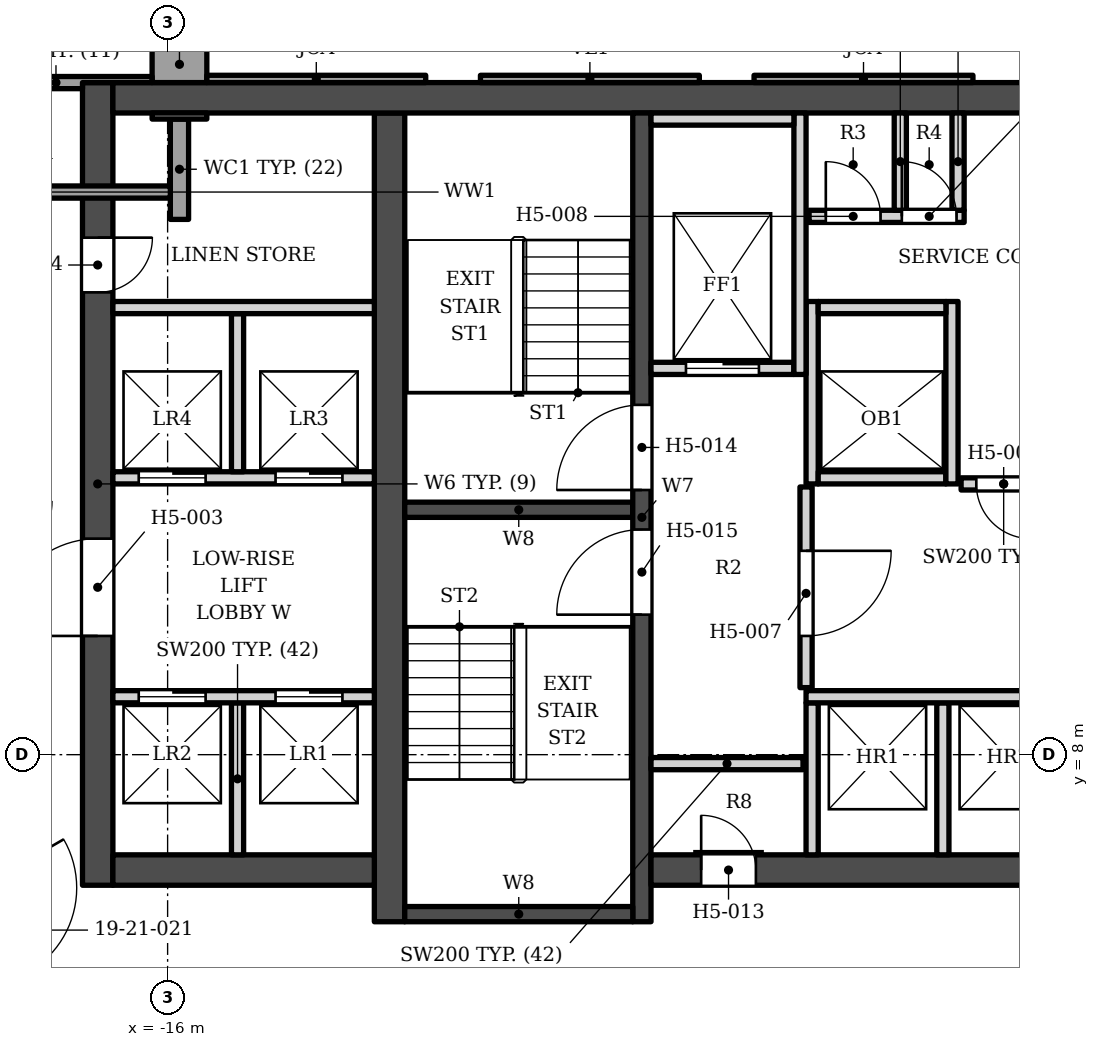
"""IFC4 building model, lengths in metres.
Left out: names, types, materials, properties, quantities, classifications, styles, units other than length and angle.
Written with IfcOpenShell. Run it as: python <this file> out.ifc"""

import sys

from ifc_helpers import new_model, si_unit, direction, frame, frame_2d, origin, place, context, subcontext, project, spatial, polyline, rectangle, outline, extrude, element, fill, save


model = new_model("IFC4")
c1 = context("Model", 3, precision=1e-05, world=origin(), true_north=direction((0.0, 1.0)))
c2 = subcontext(c1, "Body", "Model", "MODEL_VIEW")
j1 = project(units=[si_unit("LENGTHUNIT", "METRE"), si_unit("PLANEANGLEUNIT", "RADIAN")], contexts=[c1])
p1 = place(None, origin())
s1 = spatial("IfcSite", under=j1, at=p1, CompositionType="ELEMENT")
p2 = place(p1, origin())
s2 = spatial("IfcBuilding", under=s1, at=p2, CompositionType="ELEMENT")
p3 = place(p2, frame((0.0, 0.0, 91.8)))
s3 = spatial("IfcBuildingStorey", under=s2, at=p3, CompositionType="ELEMENT", Elevation=91.8)
p4 = place(p3, frame((-16.9, 18.802, 0.0), z_axis=(0.0, 0.0, 1.0), x_axis=(1.0, 0.0, 0.0)))
e1 = element("IfcWall", 1, at=p4, inside=s3, PredefinedType="SHEAR", context=c2, shape_type="SweptSolid", body=[
    extrude(rectangle(XDim=33.8, YDim=0.5, at=frame_2d((16.9, 0.0))), origin(), (0.0, 0.0, 1.0), 3.4),
])
p5 = place(p3, frame((-12.35, 5.253, 0.0), z_axis=(0.0, 0.0, 1.0), x_axis=(0.0, 1.0, 0.0)))
e2 = element("IfcWall", 2, at=p5, inside=s3, PredefinedType="SHEAR", context=c2, shape_type="SweptSolid", body=[
    extrude(rectangle(XDim=13.3, YDim=0.5, at=frame_2d((6.65, 0.0))), origin(), (0.0, 0.0, 1.0), 3.4),
])
p6 = place(p3, frame((-8.2, 5.253, 0.0), z_axis=(0.0, 0.0, 1.0), x_axis=(0.0, 1.0, 0.0)))
e3 = element("IfcWall", 3, at=p6, inside=s3, PredefinedType="SHEAR", context=c2, shape_type="SweptSolid", body=[
    extrude(rectangle(XDim=13.3, YDim=0.3, at=frame_2d((6.65, 0.0))), origin(), (0.0, 0.0, 1.0), 3.4),
])
p7 = place(p6, frame((7.1, 0.0, 0.0)))
e4 = element("IfcOpeningElement", 4, at=p7, cuts=e3, PredefinedType="OPENING", context=c2, shape_type="SweptSolid", body=[
    extrude(rectangle(XDim=1.4, YDim=2.1, at=frame_2d((0.7, 1.05))), frame((0.0, 0.16, 0.0), z_axis=(0.0, -1.0, 0.0), x_axis=(1.0, 0.0, 0.0)), (0.0, 0.0, 1.0), 0.32),
])
p8 = place(p6, frame((5.05, 0.0, 0.0)))
e5 = element("IfcOpeningElement", 5, at=p8, cuts=e3, PredefinedType="OPENING", context=c2, shape_type="SweptSolid", body=[
    extrude(rectangle(XDim=1.4, YDim=2.1, at=frame_2d((0.7, 1.05))), frame((0.0, 0.16, 0.0), z_axis=(0.0, -1.0, 0.0), x_axis=(1.0, 0.0, 0.0)), (0.0, 0.0, 1.0), 0.32),
])
for number, where, z_axis, x_axis in (
    (6, (-12.1, 12.028, 0.0), (0.0, 0.0, 1.0), (1.0, 0.0, 0.0)),
    (7, (-12.1, 5.378, 0.0), (0.0, 0.0, 1.0), (1.0, 0.0, 0.0)),
):
    element("IfcWall", number, at=place(p3, frame(where, z_axis=z_axis, x_axis=x_axis)), inside=s3, PredefinedType="SHEAR", context=c2, shape_type="SweptSolid", body=[
        extrude(rectangle(XDim=3.75, YDim=0.25, at=frame_2d((1.875, 0.0))), origin(), (0.0, 0.0, 1.0), 3.4),
    ])
p9 = place(p3, frame((-8.05, 6.103, 0.0), z_axis=(0.0, 0.0, 1.0), x_axis=(1.0, 0.0, 0.0)))
e8 = element("IfcWall", 8, at=p9, inside=s3, PredefinedType="SHEAR", context=c2, shape_type="SweptSolid", body=[
    extrude(rectangle(XDim=7.05, YDim=0.5, at=frame_2d((3.525, 0.0))), origin(), (0.0, 0.0, 1.0), 3.4),
])
p10 = place(p9, frame((0.825, 0.0, 0.0)))
e9 = element("IfcOpeningElement", 9, at=p10, cuts=e8, PredefinedType="OPENING", context=c2, shape_type="SweptSolid", body=[
    extrude(rectangle(XDim=0.9, YDim=2.1, at=frame_2d((0.45, 1.05))), frame((0.0, 0.26, 0.0), z_axis=(0.0, -1.0, 0.0), x_axis=(1.0, 0.0, 0.0)), (0.0, 0.0, 1.0), 0.52),
])
p11 = place(p3, frame((-12.6, 6.103, 0.0), z_axis=(0.0, 0.0, 1.0), x_axis=(-1.0, 0.0, 0.0)))
e10 = element("IfcWall", 10, at=p11, inside=s3, PredefinedType="SHEAR", context=c2, shape_type="SweptSolid", body=[
    extrude(rectangle(XDim=4.3, YDim=0.5, at=frame_2d((2.15, 0.0))), origin(), (0.0, 0.0, 1.0), 3.4),
])
p12 = place(p3, frame((-17.15, 5.853, 0.0), z_axis=(0.0, 0.0, 1.0), x_axis=(0.0, 1.0, 0.0)))
e11 = element("IfcWall", 11, at=p12, inside=s3, PredefinedType="SHEAR", context=c2, shape_type="SweptSolid", body=[
    extrude(rectangle(XDim=13.2, YDim=0.5, at=frame_2d((6.6, 0.0))), origin(), (0.0, 0.0, 1.0), 3.4),
])
p13 = place(p12, frame((4.1, 0.0, 0.0)))
e12 = element("IfcOpeningElement", 12, at=p13, cuts=e11, PredefinedType="OPENING", context=c2, shape_type="SweptSolid", body=[
    extrude(rectangle(XDim=1.6, YDim=2.1, at=frame_2d((0.8, 1.05))), frame((0.0, 0.26, 0.0), z_axis=(0.0, -1.0, 0.0), x_axis=(1.0, 0.0, 0.0)), (0.0, 0.0, 1.0), 0.52),
])
p14 = place(p12, frame((9.75, 0.0, 0.0)))
e13 = element("IfcOpeningElement", 13, at=p14, cuts=e11, PredefinedType="OPENING", context=c2, shape_type="SweptSolid", body=[
    extrude(rectangle(XDim=0.9, YDim=2.1, at=frame_2d((0.45, 1.05))), frame((0.0, 0.26, 0.0), z_axis=(0.0, -1.0, 0.0), x_axis=(1.0, 0.0, 0.0)), (0.0, 0.0, 1.0), 0.52),
])
p15 = place(p3, origin())
e14 = element("IfcWall", 14, at=p15, inside=s3, PredefinedType="SOLIDWALL", context=c2, shape_type="SweptSolid", body=[
    extrude(outline(polyline([(-15.355, 19.052), (-15.355, 19.653), (-16.255, 19.653), (-16.255, 19.052), (-15.355, 19.052)])), origin(), (0.0, 0.0, 1.0), 2.65),
])
p16 = place(p3, origin())
e15 = element("IfcWall", 15, at=p16, inside=s3, PredefinedType="SOLIDWALL", context=c2, shape_type="SweptSolid", body=[
    extrude(outline(polyline([(-15.355, 18.453), (-15.355, 18.552), (-16.255, 18.552), (-16.255, 18.453), (-15.355, 18.453)])), origin(), (0.0, 0.0, 1.0), 2.65),
])
p17 = place(p3, origin())
e16 = element("IfcWall", 16, at=p17, inside=s3, PredefinedType="SOLIDWALL", context=c2, shape_type="SweptSolid", body=[
    extrude(outline(polyline([(-15.655, 16.802), (-15.655, 18.453), (-15.955, 18.453), (-15.955, 16.802), (-15.655, 16.802)])), origin(), (0.0, 0.0, 1.0), 2.65),
])
p18 = place(p3, origin())
e17 = element("IfcWall", 17, at=p18, inside=s3, PredefinedType="SOLIDWALL", context=c2, shape_type="SweptSolid", body=[
    extrude(outline(polyline([(-6.355, 19.173), (-6.355, 19.052), (-2.755, 19.052), (-2.755, 19.173), (-6.355, 19.173)])), origin(), (0.0, 0.0, 1.0), 2.65),
])
p19 = place(p3, origin())
e18 = element("IfcWall", 18, at=p19, inside=s3, PredefinedType="ELEMENTEDWALL", context=c2, shape_type="SweptSolid", body=[
    extrude(outline(polyline([(-10.855, 19.173), (-10.855, 19.052), (-7.255, 19.052), (-7.255, 19.173), (-10.855, 19.173)])), origin(), (0.0, 0.0, 1.0), 2.65),
])
p20 = place(p3, origin())
e19 = element("IfcWall", 19, at=p20, inside=s3, PredefinedType="SOLIDWALL", context=c2, shape_type="SweptSolid", body=[
    extrude(outline(polyline([(-15.354, 19.173), (-15.354, 19.052), (-11.755, 19.052), (-11.755, 19.173), (-15.354, 19.173)])), origin(), (0.0, 0.0, 1.0), 2.65),
])
p21 = place(p3, origin())
e20 = element("IfcWall", 20, at=p21, inside=s3, PredefinedType="SOLIDWALL", context=c2, shape_type="SweptSolid", body=[
    extrude(outline(polyline([(-16.255, 19.052), (-16.255, 19.153), (-19.853, 19.153), (-19.853, 18.953), (-17.4, 18.953), (-17.4, 19.052), (-16.255, 19.052)])), origin(), (0.0, 0.0, 1.0), 2.65),
])
p22 = place(p3, frame((-15.955, 17.252, 0.0), z_axis=(0.0, 0.0, 1.0), x_axis=(-1.0, 0.0, 0.0)))
e21 = element("IfcWall", 21, at=p22, inside=s3, PredefinedType="ELEMENTEDWALL", context=c2, shape_type="SweptSolid", body=[
    extrude(rectangle(XDim=4.2, YDim=0.2, at=frame_2d((2.1, 0.0))), origin(), (0.0, 0.0, 1.0), 2.65),
])
p23 = place(p22, frame((2.7, 0.0, 0.0)))
e22 = element("IfcOpeningElement", 22, at=p23, cuts=e21, PredefinedType="OPENING", context=c2, shape_type="SweptSolid", body=[
    extrude(rectangle(XDim=1.2, YDim=2.4, at=frame_2d((0.6, 1.2))), frame((0.0, 0.11, 0.0), z_axis=(0.0, -1.0, 0.0), x_axis=(1.0, 0.0, 0.0)), (0.0, 0.0, 1.0), 0.22),
])
for number, where, z_axis, x_axis in (
    (23, (-14.85, 6.353, 0.0), (0.0, 0.0, 1.0), (0.0, 1.0, 0.0)),
    (24, (-5.4, 6.353, 0.0), (0.0, 0.0, 1.0), (0.0, 1.0, 0.0)),
    (25, (-3.25, 6.353, 0.0), (0.0, 0.0, 1.0), (0.0, 1.0, 0.0)),
    (26, (-8.05, 7.853, 0.0), (0.0, 0.0, 1.0), (1.0, 0.0, 0.0)),
):
    element("IfcWall", number, at=place(p3, frame(where, z_axis=z_axis, x_axis=x_axis)), inside=s3, PredefinedType="SOLIDWALL", context=c2, shape_type="SweptSolid", body=[
        extrude(rectangle(XDim=2.5, YDim=0.2, at=frame_2d((1.25, 0.0))), origin(), (0.0, 0.0, 1.0), 3.23),
    ])
p24 = place(p3, frame((-16.9, 8.953, 0.0), z_axis=(0.0, 0.0, 1.0), x_axis=(1.0, 0.0, 0.0)))
e27 = element("IfcWall", 27, at=p24, inside=s3, PredefinedType="SOLIDWALL", context=c2, shape_type="SweptSolid", body=[
    extrude(rectangle(XDim=4.3, YDim=0.2, at=frame_2d((2.15, 0.0))), origin(), (0.0, 0.0, 1.0), 3.23),
])
p25 = place(p24, frame((2.675, 0.0, 0.0)))
e28 = element("IfcOpeningElement", 28, at=p25, cuts=e27, PredefinedType="OPENING", context=c2, shape_type="SweptSolid", body=[
    extrude(rectangle(XDim=1.1, YDim=2.1, at=frame_2d((0.55, 1.05))), frame((0.0, 0.11, 0.0), z_axis=(0.0, -1.0, 0.0), x_axis=(1.0, 0.0, 0.0)), (0.0, 0.0, 1.0), 0.22),
])
p26 = place(p24, frame((0.425, 0.0, 0.0)))
e29 = element("IfcOpeningElement", 29, at=p26, cuts=e27, PredefinedType="OPENING", context=c2, shape_type="SweptSolid", body=[
    extrude(rectangle(XDim=1.1, YDim=2.1, at=frame_2d((0.55, 1.05))), frame((0.0, 0.11, 0.0), z_axis=(0.0, -1.0, 0.0), x_axis=(1.0, 0.0, 0.0)), (0.0, 0.0, 1.0), 0.22),
])
p27 = place(p3, frame((-5.5, 8.953, 0.0), z_axis=(0.0, 0.0, 1.0), x_axis=(1.0, 0.0, 0.0)))
e30 = element("IfcWall", 30, at=p27, inside=s3, PredefinedType="SOLIDWALL", context=c2, shape_type="SweptSolid", body=[
    extrude(rectangle(XDim=4.5, YDim=0.2, at=frame_2d((2.25, 0.0))), origin(), (0.0, 0.0, 1.0), 3.23),
])
p28 = place(p3, frame((-5.5, 9.103, 0.0), z_axis=(0.0, 0.0, 1.0), x_axis=(0.0, 1.0, 0.0)))
e31 = element("IfcWall", 31, at=p28, inside=s3, PredefinedType="SOLIDWALL", context=c2, shape_type="SweptSolid", body=[
    extrude(rectangle(XDim=3.3, YDim=0.2, at=frame_2d((1.65, 0.0))), origin(), (0.0, 0.0, 1.0), 3.23),
])
p29 = place(p28, frame((0.85, 0.0, 0.0)))
e32 = element("IfcOpeningElement", 32, at=p29, cuts=e31, PredefinedType="OPENING", context=c2, shape_type="SweptSolid", body=[
    extrude(rectangle(XDim=1.4, YDim=2.1, at=frame_2d((0.7, 1.05))), frame((0.0, 0.11, 0.0), z_axis=(0.0, -1.0, 0.0), x_axis=(1.0, 0.0, 0.0)), (0.0, 0.0, 1.0), 0.22),
])
p30 = place(p3, frame((-2.95, 12.453, 0.0), z_axis=(0.0, 0.0, 1.0), x_axis=(1.0, 0.0, 0.0)))
e33 = element("IfcWall", 33, at=p30, inside=s3, PredefinedType="SOLIDWALL", context=c2, shape_type="SweptSolid", body=[
    extrude(rectangle(XDim=1.4, YDim=0.2, at=frame_2d((0.7, 0.0))), origin(), (0.0, 0.0, 1.0), 3.23),
])
p31 = place(p30, frame((0.25, 0.0, 0.0)))
e34 = element("IfcOpeningElement", 34, at=p31, cuts=e33, PredefinedType="OPENING", context=c2, shape_type="SweptSolid", body=[
    extrude(rectangle(XDim=0.9, YDim=2.1, at=frame_2d((0.45, 1.05))), frame((0.0, 0.11, 0.0), z_axis=(0.0, -1.0, 0.0), x_axis=(1.0, 0.0, 0.0)), (0.0, 0.0, 1.0), 0.22),
])
p32 = place(p3, frame((-16.9, 12.552, 0.0), z_axis=(0.0, 0.0, 1.0), x_axis=(1.0, 0.0, 0.0)))
e35 = element("IfcWall", 35, at=p32, inside=s3, PredefinedType="SOLIDWALL", context=c2, shape_type="SweptSolid", body=[
    extrude(rectangle(XDim=4.3, YDim=0.2, at=frame_2d((2.15, 0.0))), origin(), (0.0, 0.0, 1.0), 3.23),
])
p33 = place(p32, frame((2.675, 0.0, 0.0)))
e36 = element("IfcOpeningElement", 36, at=p33, cuts=e35, PredefinedType="OPENING", context=c2, shape_type="SweptSolid", body=[
    extrude(rectangle(XDim=1.1, YDim=2.1, at=frame_2d((0.55, 1.05))), frame((0.0, 0.11, 0.0), z_axis=(0.0, -1.0, 0.0), x_axis=(1.0, 0.0, 0.0)), (0.0, 0.0, 1.0), 0.22),
])
p34 = place(p32, frame((0.425, 0.0, 0.0)))
e37 = element("IfcOpeningElement", 37, at=p34, cuts=e35, PredefinedType="OPENING", context=c2, shape_type="SweptSolid", body=[
    extrude(rectangle(XDim=1.1, YDim=2.1, at=frame_2d((0.55, 1.05))), frame((0.0, 0.11, 0.0), z_axis=(0.0, -1.0, 0.0), x_axis=(1.0, 0.0, 0.0)), (0.0, 0.0, 1.0), 0.22),
])
p35 = place(p3, frame((-5.4, 12.453, 0.0), z_axis=(0.0, 0.0, 1.0), x_axis=(0.0, 1.0, 0.0)))
e38 = element("IfcWall", 38, at=p35, inside=s3, PredefinedType="SOLIDWALL", context=c2, shape_type="SweptSolid", body=[
    extrude(rectangle(XDim=3.0, YDim=0.2, at=frame_2d((1.5, 0.0))), origin(), (0.0, 0.0, 1.0), 3.23),
])
p36 = place(p3, frame((-5.3, 12.552, 0.0), z_axis=(0.0, 0.0, 1.0), x_axis=(1.0, 0.0, 0.0)))
e39 = element("IfcWall", 39, at=p36, inside=s3, PredefinedType="SOLIDWALL", context=c2, shape_type="SweptSolid", body=[
    extrude(rectangle(XDim=2.1, YDim=0.2, at=frame_2d((1.05, 0.0))), origin(), (0.0, 0.0, 1.0), 3.23),
])
p37 = place(p3, frame((-3.1, 12.453, 0.0), z_axis=(0.0, 0.0, 1.0), x_axis=(0.0, 1.0, 0.0)))
e40 = element("IfcWall", 40, at=p37, inside=s3, PredefinedType="SOLIDWALL", context=c2, shape_type="SweptSolid", body=[
    extrude(rectangle(XDim=3.0, YDim=0.2, at=frame_2d((1.5, 0.0))), origin(), (0.0, 0.0, 1.0), 3.23),
])
p38 = place(p3, frame((-14.85, 12.653, 0.0), z_axis=(0.0, 0.0, 1.0), x_axis=(0.0, 1.0, 0.0)))
e41 = element("IfcWall", 41, at=p38, inside=s3, PredefinedType="SOLIDWALL", context=c2, shape_type="SweptSolid", body=[
    extrude(rectangle(XDim=2.6, YDim=0.2, at=frame_2d((1.3, 0.0))), origin(), (0.0, 0.0, 1.0), 3.23),
])
p39 = place(p3, frame((-8.05, 14.353, 0.0), z_axis=(0.0, 0.0, 1.0), x_axis=(1.0, 0.0, 0.0)))
e42 = element("IfcWall", 42, at=p39, inside=s3, PredefinedType="SOLIDWALL", context=c2, shape_type="SweptSolid", body=[
    extrude(rectangle(XDim=2.35, YDim=0.2, at=frame_2d((1.175, 0.0))), origin(), (0.0, 0.0, 1.0), 3.23),
])
p40 = place(p39, frame((0.575, 0.0, 0.0)))
e43 = element("IfcOpeningElement", 43, at=p40, cuts=e42, PredefinedType="OPENING", context=c2, shape_type="SweptSolid", body=[
    extrude(rectangle(XDim=1.2, YDim=2.1, at=frame_2d((0.6, 1.05))), frame((0.0, 0.11, 0.0), z_axis=(0.0, -1.0, 0.0), x_axis=(1.0, 0.0, 0.0)), (0.0, 0.0, 1.0), 0.22),
])
for number, where, z_axis, x_axis in (
    (44, (-5.6, 14.253, 0.0), (0.0, 0.0, 1.0), (0.0, 1.0, 0.0)),
    (45, (-16.9, 15.353, 0.0), (0.0, 0.0, 1.0), (1.0, 0.0, 0.0)),
):
    element("IfcWall", number, at=place(p3, frame(where, z_axis=z_axis, x_axis=x_axis)), inside=s3, PredefinedType="SOLIDWALL", context=c2, shape_type="SweptSolid", body=[
        extrude(rectangle(XDim=4.3, YDim=0.2, at=frame_2d((2.15, 0.0))), origin(), (0.0, 0.0, 1.0), 3.23),
    ])
p41 = place(p3, frame((-5.3, 15.353, 0.0), z_axis=(0.0, 0.0, 1.0), x_axis=(1.0, 0.0, 0.0)))
e46 = element("IfcWall", 46, at=p41, inside=s3, PredefinedType="SOLIDWALL", context=c2, shape_type="SweptSolid", body=[
    extrude(rectangle(XDim=2.1, YDim=0.2, at=frame_2d((1.05, 0.0))), origin(), (0.0, 0.0, 1.0), 3.23),
])
p42 = place(p3, frame((-5.45, 16.853, 0.0), z_axis=(0.0, 0.0, 1.0), x_axis=(1.0, 0.0, 0.0)))
e47 = element("IfcWall", 47, at=p42, inside=s3, PredefinedType="SOLIDWALL", context=c2, shape_type="SweptSolid", body=[
    extrude(rectangle(XDim=2.55, YDim=0.2, at=frame_2d((1.275, 0.0))), origin(), (0.0, 0.0, 1.0), 3.23),
])
p43 = place(p42, frame((0.275, 0.0, 0.0)))
e48 = element("IfcOpeningElement", 48, at=p43, cuts=e47, PredefinedType="OPENING", context=c2, shape_type="SweptSolid", body=[
    extrude(rectangle(XDim=0.9, YDim=2.1, at=frame_2d((0.45, 1.05))), frame((0.0, 0.11, 0.0), z_axis=(0.0, -1.0, 0.0), x_axis=(1.0, 0.0, 0.0)), (0.0, 0.0, 1.0), 0.22),
])
p44 = place(p42, frame((1.525, 0.0, 0.0)))
e49 = element("IfcOpeningElement", 49, at=p44, cuts=e47, PredefinedType="OPENING", context=c2, shape_type="SweptSolid", body=[
    extrude(rectangle(XDim=0.9, YDim=2.1, at=frame_2d((0.45, 1.05))), frame((0.0, 0.11, 0.0), z_axis=(0.0, -1.0, 0.0), x_axis=(1.0, 0.0, 0.0)), (0.0, 0.0, 1.0), 0.22),
])
for number, where, z_axis, x_axis in (
    (50, (-3.95, 16.953, 0.0), (0.0, 0.0, 1.0), (0.0, 1.0, 0.0)),
    (51, (-3.0, 16.953, 0.0), (0.0, 0.0, 1.0), (0.0, 1.0, 0.0)),
):
    element("IfcWall", number, at=place(p3, frame(where, z_axis=z_axis, x_axis=x_axis)), inside=s3, PredefinedType="PARTITIONING", context=c2, shape_type="SweptSolid", body=[
        extrude(rectangle(XDim=1.6, YDim=0.2, at=frame_2d((0.8, 0.0))), origin(), (0.0, 0.0, 1.0), 3.23),
    ])
p45 = place(p3, frame((-8.05, 18.453, 0.0), z_axis=(0.0, 0.0, 1.0), x_axis=(1.0, 0.0, 0.0)))
e52 = element("IfcWall", 52, at=p45, inside=s3, PredefinedType="SOLIDWALL", context=c2, shape_type="SweptSolid", body=[
    extrude(rectangle(XDim=2.35, YDim=0.2, at=frame_2d((1.175, 0.0))), origin(), (0.0, 0.0, 1.0), 3.23),
])
p46 = place(p40, origin())
e53 = element("IfcDoor", 53, at=p46, inside=s3, OperationType="DOUBLE_DOOR_SLIDING", PredefinedType="DOOR", context=c2, shape_type="SweptSolid", body=[
    extrude(rectangle(XDim=1.2, YDim=2.1, at=frame_2d((0.6, 1.05))), frame((0.0, 0.025, 0.0), z_axis=(0.0, -1.0, 0.0), x_axis=(1.0, 0.0, 0.0)), (0.0, 0.0, 1.0), 0.05),
])
fill(e43, e53)
p47 = place(p25, origin())
e54 = element("IfcDoor", 54, at=p47, inside=s3, OperationType="DOUBLE_DOOR_SLIDING", PredefinedType="DOOR", context=c2, shape_type="SweptSolid", body=[
    extrude(rectangle(XDim=1.1, YDim=2.1, at=frame_2d((0.55, 1.05))), frame((0.0, 0.025, 0.0), z_axis=(0.0, -1.0, 0.0), x_axis=(1.0, 0.0, 0.0)), (0.0, 0.0, 1.0), 0.05),
])
fill(e28, e54)
p48 = place(p33, origin())
e55 = element("IfcDoor", 55, at=p48, inside=s3, OperationType="DOUBLE_DOOR_SLIDING", PredefinedType="DOOR", context=c2, shape_type="SweptSolid", body=[
    extrude(rectangle(XDim=1.1, YDim=2.1, at=frame_2d((0.55, 1.05))), frame((0.0, 0.025, 0.0), z_axis=(0.0, -1.0, 0.0), x_axis=(1.0, 0.0, 0.0)), (0.0, 0.0, 1.0), 0.05),
])
fill(e36, e55)
p49 = place(p26, origin())
e56 = element("IfcDoor", 56, at=p49, inside=s3, OperationType="DOUBLE_DOOR_SLIDING", PredefinedType="DOOR", context=c2, shape_type="SweptSolid", body=[
    extrude(rectangle(XDim=1.1, YDim=2.1, at=frame_2d((0.55, 1.05))), frame((0.0, 0.025, 0.0), z_axis=(0.0, -1.0, 0.0), x_axis=(1.0, 0.0, 0.0)), (0.0, 0.0, 1.0), 0.05),
])
fill(e29, e56)
p50 = place(p34, origin())
e57 = element("IfcDoor", 57, at=p50, inside=s3, OperationType="DOUBLE_DOOR_SLIDING", PredefinedType="DOOR", context=c2, shape_type="SweptSolid", body=[
    extrude(rectangle(XDim=1.1, YDim=2.1, at=frame_2d((0.55, 1.05))), frame((0.0, 0.025, 0.0), z_axis=(0.0, -1.0, 0.0), x_axis=(1.0, 0.0, 0.0)), (0.0, 0.0, 1.0), 0.05),
])
fill(e37, e57)
p51 = place(p7, origin())
e58 = element("IfcDoor", 58, at=p51, inside=s3, OperationType="SINGLE_SWING_LEFT", PredefinedType="DOOR", context=c2, shape_type="SweptSolid", body=[
    extrude(rectangle(XDim=1.4, YDim=2.1, at=frame_2d((0.7, 1.05))), frame((0.0, 0.025, 0.0), z_axis=(0.0, -1.0, 0.0), x_axis=(1.0, 0.0, 0.0)), (0.0, 0.0, 1.0), 0.05),
])
fill(e4, e58)
p52 = place(p8, origin())
e59 = element("IfcDoor", 59, at=p52, inside=s3, OperationType="SINGLE_SWING_LEFT", PredefinedType="DOOR", context=c2, shape_type="SweptSolid", body=[
    extrude(rectangle(XDim=1.4, YDim=2.1, at=frame_2d((0.7, 1.05))), frame((0.0, 0.025, 0.0), z_axis=(0.0, -1.0, 0.0), x_axis=(1.0, 0.0, 0.0)), (0.0, 0.0, 1.0), 0.05),
])
fill(e5, e59)
p53 = place(p31, origin())
e60 = element("IfcDoor", 60, at=p53, inside=s3, OperationType="SINGLE_SWING_RIGHT", PredefinedType="DOOR", context=c2, shape_type="SweptSolid", body=[
    extrude(rectangle(XDim=0.9, YDim=2.1, at=frame_2d((0.45, 1.05))), frame((0.0, 0.025, 0.0), z_axis=(0.0, -1.0, 0.0), x_axis=(1.0, 0.0, 0.0)), (0.0, 0.0, 1.0), 0.05),
])
fill(e34, e60)
p54 = place(p29, origin())
e61 = element("IfcDoor", 61, at=p54, inside=s3, OperationType="SINGLE_SWING_RIGHT", PredefinedType="DOOR", context=c2, shape_type="SweptSolid", body=[
    extrude(rectangle(XDim=1.4, YDim=2.1, at=frame_2d((0.7, 1.05))), frame((0.0, 0.025, 0.0), z_axis=(0.0, -1.0, 0.0), x_axis=(1.0, 0.0, 0.0)), (0.0, 0.0, 1.0), 0.05),
])
fill(e32, e61)
p55 = place(p43, origin())
e62 = element("IfcDoor", 62, at=p55, inside=s3, OperationType="SINGLE_SWING_LEFT", PredefinedType="DOOR", context=c2, shape_type="SweptSolid", body=[
    extrude(rectangle(XDim=0.9, YDim=2.1, at=frame_2d((0.45, 1.05))), frame((0.0, 0.025, 0.0), z_axis=(0.0, -1.0, 0.0), x_axis=(1.0, 0.0, 0.0)), (0.0, 0.0, 1.0), 0.05),
])
fill(e48, e62)
p56 = place(p44, origin())
e63 = element("IfcDoor", 63, at=p56, inside=s3, OperationType="SINGLE_SWING_LEFT", PredefinedType="DOOR", context=c2, shape_type="SweptSolid", body=[
    extrude(rectangle(XDim=0.9, YDim=2.1, at=frame_2d((0.45, 1.05))), frame((0.0, 0.025, 0.0), z_axis=(0.0, -1.0, 0.0), x_axis=(1.0, 0.0, 0.0)), (0.0, 0.0, 1.0), 0.05),
])
fill(e49, e63)
p57 = place(p10, origin())
e64 = element("IfcDoor", 64, at=p57, inside=s3, OperationType="SINGLE_SWING_LEFT", PredefinedType="DOOR", context=c2, shape_type="SweptSolid", body=[
    extrude(rectangle(XDim=0.9, YDim=2.1, at=frame_2d((0.45, 1.05))), frame((0.0, 0.025, 0.0), z_axis=(0.0, -1.0, 0.0), x_axis=(1.0, 0.0, 0.0)), (0.0, 0.0, 1.0), 0.05),
])
fill(e9, e64)
p58 = place(p13, origin())
e65 = element("IfcDoor", 65, at=p58, inside=s3, OperationType="DOUBLE_DOOR_SINGLE_SWING", PredefinedType="DOOR", context=c2, shape_type="SweptSolid", body=[
    extrude(rectangle(XDim=1.6, YDim=2.1, at=frame_2d((0.8, 1.05))), frame((0.0, 0.025, 0.0), z_axis=(0.0, -1.0, 0.0), x_axis=(1.0, 0.0, 0.0)), (0.0, 0.0, 1.0), 0.05),
])
fill(e12, e65)
p59 = place(p14, origin())
e66 = element("IfcDoor", 66, at=p59, inside=s3, OperationType="SINGLE_SWING_RIGHT", PredefinedType="DOOR", context=c2, shape_type="SweptSolid", body=[
    extrude(rectangle(XDim=0.9, YDim=2.1, at=frame_2d((0.45, 1.05))), frame((0.0, 0.025, 0.0), z_axis=(0.0, -1.0, 0.0), x_axis=(1.0, 0.0, 0.0)), (0.0, 0.0, 1.0), 0.05),
])
fill(e13, e66)
save(model, sys.argv[1])
